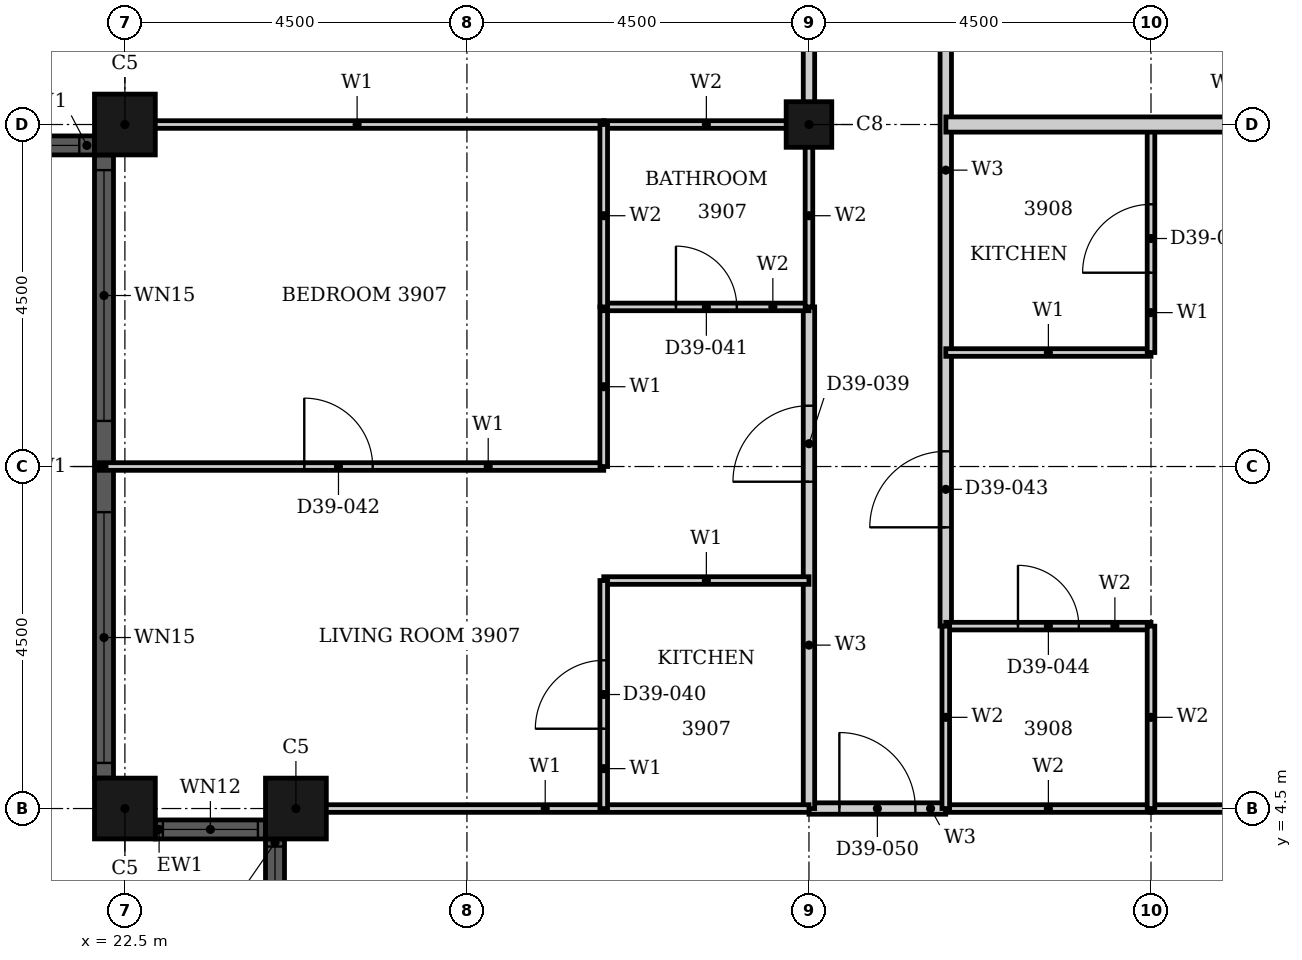
"""IFC4 building model, lengths in metres.
Left out: names, types, materials, properties, quantities, classifications, styles, units other than length and angle.
Written with IfcOpenShell. Run it as: python <this file> out.ifc"""

import sys

from ifc_helpers import new_model, si_unit, direction, frame, frame_2d, origin, origin_2d, place, context, subcontext, project, spatial, rectangle, hollow_rectangle, extrude, element, fill, save


model = new_model("IFC4")
c1 = context("Model", 3, precision=1e-05, world=origin(), true_north=direction((0.0, 1.0)))
c2 = subcontext(c1, "Body", "Model", "MODEL_VIEW")
j1 = project(units=[si_unit("LENGTHUNIT", "METRE"), si_unit("PLANEANGLEUNIT", "RADIAN")], contexts=[c1])
p1 = place(None, origin())
s1 = spatial("IfcSite", under=j1, at=p1, CompositionType="ELEMENT")
p2 = place(p1, origin())
s2 = spatial("IfcBuilding", under=s1, at=p2, CompositionType="ELEMENT")
p3 = place(p2, frame((0.0, 0.0, 158.0)))
s3 = spatial("IfcBuildingStorey", under=s2, at=p3, CompositionType="ELEMENT", Elevation=158.0)
for number, where, z_axis, x_axis in (
    (1, (22.5, 4.5, 0.0), (0.0, 0.0, 1.0), (1.0, 0.0, 0.0)),
    (2, (24.75, 4.5, 0.0), (0.0, 0.0, 1.0), (1.0, 0.0, 0.0)),
    (3, (22.5, 13.5, 0.0), (0.0, 0.0, 1.0), (1.0, 0.0, 0.0)),
):
    element("IfcColumn", number, at=place(p3, frame(where, z_axis=z_axis, x_axis=x_axis)), inside=s3, PredefinedType="COLUMN", context=c2, shape_type="SweptSolid", body=[
        extrude(hollow_rectangle(XDim=0.8, YDim=0.8, WallThickness=0.025, at=origin_2d()), origin(), (0.0, 0.0, 1.0), 3.7),
    ])
p4 = place(p3, frame((31.5, 13.5, 0.0), z_axis=(0.0, 0.0, 1.0), x_axis=(1.0, 0.0, 0.0)))
e4 = element("IfcColumn", 4, at=p4, inside=s3, PredefinedType="COLUMN", context=c2, shape_type="SweptSolid", body=[
    extrude(hollow_rectangle(XDim=0.6, YDim=0.6, WallThickness=0.02, at=origin_2d()), origin(), (0.0, 0.0, 1.0), 3.7),
])
p5 = place(p3, frame((22.9, 4.225, 0.0), z_axis=(0.0, 0.0, 1.0), x_axis=(1.0, 0.0, 0.0)))
e5 = element("IfcWall", 5, at=p5, inside=s3, PredefinedType="SOLIDWALL", context=c2, shape_type="SweptSolid", body=[
    extrude(rectangle(XDim=1.45, YDim=0.25, at=frame_2d((0.725, 0.0))), origin(), (0.0, 0.0, 1.0), 3.7),
])
p6 = place(p5, frame((0.1, 0.0, 0.9)))
e6 = element("IfcOpeningElement", 6, at=p6, cuts=e5, PredefinedType="OPENING", context=c2, shape_type="SweptSolid", body=[
    extrude(rectangle(XDim=1.25, YDim=2.08, at=frame_2d((0.625, 1.04))), frame((0.0, 0.135, 0.0), z_axis=(0.0, -1.0, 0.0), x_axis=(1.0, 0.0, 0.0)), (0.0, 0.0, 1.0), 0.27),
])
p7 = place(p3, frame((24.475, 4.1, 0.0), z_axis=(0.0, 0.0, 1.0), x_axis=(0.0, -1.0, 0.0)))
e7 = element("IfcWall", 7, at=p7, inside=s3, PredefinedType="SOLIDWALL", context=c2, shape_type="SweptSolid", body=[
    extrude(rectangle(XDim=1.45, YDim=0.25, at=frame_2d((0.725, 0.0))), origin(), (0.0, 0.0, 1.0), 3.7),
])
p8 = place(p7, frame((0.1, 0.0, 0.9)))
e8 = element("IfcOpeningElement", 8, at=p8, cuts=e7, PredefinedType="OPENING", context=c2, shape_type="SweptSolid", body=[
    extrude(rectangle(XDim=1.25, YDim=1.85, at=frame_2d((0.625, 0.925))), frame((0.0, 0.135, 0.0), z_axis=(0.0, -1.0, 0.0), x_axis=(1.0, 0.0, 0.0)), (0.0, 0.0, 1.0), 0.27),
])
p9 = place(p3, frame((18.4, 13.225, 0.0), z_axis=(0.0, 0.0, 1.0), x_axis=(1.0, 0.0, 0.0)))
e9 = element("IfcWall", 9, at=p9, inside=s3, PredefinedType="SOLIDWALL", context=c2, shape_type="SweptSolid", body=[
    extrude(rectangle(XDim=3.7, YDim=0.25, at=frame_2d((1.85, 0.0))), origin(), (0.0, 0.0, 1.0), 3.7),
])
p10 = place(p9, frame((0.2, 0.0, 0.45)))
e10 = element("IfcOpeningElement", 10, at=p10, cuts=e9, PredefinedType="OPENING", context=c2, shape_type="SweptSolid", body=[
    extrude(rectangle(XDim=3.3, YDim=2.3, at=frame_2d((1.65, 1.15))), frame((0.0, 0.135, 0.0), z_axis=(0.0, -1.0, 0.0), x_axis=(1.0, 0.0, 0.0)), (0.0, 0.0, 1.0), 0.27),
])
p11 = place(p3, frame((22.225, 13.1, 0.0), z_axis=(0.0, 0.0, 1.0), x_axis=(0.0, -1.0, 0.0)))
e11 = element("IfcWall", 11, at=p11, inside=s3, PredefinedType="SOLIDWALL", context=c2, shape_type="SweptSolid", body=[
    extrude(rectangle(XDim=8.2, YDim=0.25, at=frame_2d((4.1, 0.0))), origin(), (0.0, 0.0, 1.0), 3.7),
])
p12 = place(p11, frame((0.2, 0.0, 0.45)))
e12 = element("IfcOpeningElement", 12, at=p12, cuts=e11, PredefinedType="OPENING", context=c2, shape_type="SweptSolid", body=[
    extrude(rectangle(XDim=3.3, YDim=2.3, at=frame_2d((1.65, 1.15))), frame((0.0, 0.135, 0.0), z_axis=(0.0, -1.0, 0.0), x_axis=(1.0, 0.0, 0.0)), (0.0, 0.0, 1.0), 0.27),
])
p13 = place(p11, frame((4.7, 0.0, 0.45)))
e13 = element("IfcOpeningElement", 13, at=p13, cuts=e11, PredefinedType="OPENING", context=c2, shape_type="SweptSolid", body=[
    extrude(rectangle(XDim=3.3, YDim=2.3, at=frame_2d((1.65, 1.15))), frame((0.0, 0.135, 0.0), z_axis=(0.0, -1.0, 0.0), x_axis=(1.0, 0.0, 0.0)), (0.0, 0.0, 1.0), 0.27),
])
p14 = place(p3, frame((31.5, 4.5, 0.0), z_axis=(0.0, 0.0, 1.0), x_axis=(1.0, 0.0, 0.0)))
e14 = element("IfcWall", 14, at=p14, inside=s3, PredefinedType="PARTITIONING", context=c2, shape_type="SweptSolid", body=[
    extrude(rectangle(XDim=1.8, YDim=0.15, at=frame_2d((0.9, 0.0))), origin(), (0.0, 0.0, 1.0), 3.4),
])
p15 = place(p14, frame((0.4, 0.0, 0.0)))
e15 = element("IfcOpeningElement", 15, at=p15, cuts=e14, PredefinedType="OPENING", context=c2, shape_type="SweptSolid", body=[
    extrude(rectangle(XDim=1.0, YDim=2.1, at=frame_2d((0.5, 1.05))), frame((0.0, 0.085, 0.0), z_axis=(0.0, -1.0, 0.0), x_axis=(1.0, 0.0, 0.0)), (0.0, 0.0, 1.0), 0.17),
])
p16 = place(p3, frame((31.5, 4.5, 0.0), z_axis=(0.0, 0.0, 1.0), x_axis=(0.0, 1.0, 0.0)))
e16 = element("IfcWall", 16, at=p16, inside=s3, PredefinedType="PARTITIONING", context=c2, shape_type="SweptSolid", body=[
    extrude(rectangle(XDim=6.6, YDim=0.15, at=frame_2d((3.3, 0.0))), origin(), (0.0, 0.0, 1.0), 2.68),
])
p17 = place(p16, frame((4.3, 0.0, 0.0)))
e17 = element("IfcOpeningElement", 17, at=p17, cuts=e16, PredefinedType="OPENING", context=c2, shape_type="SweptSolid", body=[
    extrude(rectangle(XDim=1.0, YDim=2.2, at=frame_2d((0.5, 1.1))), frame((0.0, 0.085, 0.0), z_axis=(0.0, -1.0, 0.0), x_axis=(1.0, 0.0, 0.0)), (0.0, 0.0, 1.0), 0.17),
])
p18 = place(p3, frame((31.5, 13.5, 0.0), z_axis=(0.0, 0.0, 1.0), x_axis=(0.0, 1.0, 0.0)))
e18 = element("IfcWall", 18, at=p18, inside=s3, PredefinedType="PARTITIONING", context=c2, shape_type="SweptSolid", body=[
    extrude(rectangle(XDim=7.2, YDim=0.15, at=frame_2d((3.6, 0.0))), origin(), (0.0, 0.0, 1.0), 3.4),
])
p19 = place(p3, frame((33.3, 6.9, 0.0), z_axis=(0.0, 0.0, 1.0), x_axis=(0.0, 1.0, 0.0)))
e19 = element("IfcWall", 19, at=p19, inside=s3, PredefinedType="PARTITIONING", context=c2, shape_type="SweptSolid", body=[
    extrude(rectangle(XDim=13.799, YDim=0.15, at=frame_2d((6.899, 0.0))), origin(), (0.0, 0.0, 1.0), 3.4),
])
p20 = place(p19, frame((9.699, 0.0, 0.0)))
e20 = element("IfcOpeningElement", 20, at=p20, cuts=e19, PredefinedType="OPENING", context=c2, shape_type="SweptSolid", body=[
    extrude(rectangle(XDim=1.0, YDim=2.2, at=frame_2d((0.5, 1.1))), frame((0.0, 0.085, 0.0), z_axis=(0.0, -1.0, 0.0), x_axis=(1.0, 0.0, 0.0)), (0.0, 0.0, 1.0), 0.17),
])
p21 = place(p19, frame((1.3, 0.0, 0.0)))
e21 = element("IfcOpeningElement", 21, at=p21, cuts=e19, PredefinedType="OPENING", context=c2, shape_type="SweptSolid", body=[
    extrude(rectangle(XDim=1.0, YDim=2.2, at=frame_2d((0.5, 1.1))), frame((0.0, 0.085, 0.0), z_axis=(0.0, -1.0, 0.0), x_axis=(1.0, 0.0, 0.0)), (0.0, 0.0, 1.0), 0.17),
])
p22 = place(p3, frame((33.3, 10.5, 0.0), z_axis=(0.0, 0.0, 1.0), x_axis=(1.0, 0.0, 0.0)))
e22 = element("IfcWall", 22, at=p22, inside=s3, PredefinedType="PARTITIONING", context=c2, shape_type="SweptSolid", body=[
    extrude(rectangle(XDim=2.7, YDim=0.1, at=frame_2d((1.35, 0.0))), origin(), (0.0, 0.0, 1.0), 3.4),
])
p23 = place(p3, frame((22.31, 13.5, 0.0), z_axis=(0.0, 0.0, 1.0), x_axis=(1.0, 0.0, 0.0)))
e23 = element("IfcWall", 23, at=p23, inside=s3, PredefinedType="PARTITIONING", context=c2, shape_type="SweptSolid", body=[
    extrude(rectangle(XDim=6.49, YDim=0.1, at=frame_2d((3.245, 0.0))), origin(), (0.0, 0.0, 1.0), 2.48),
])
p24 = place(p3, frame((36.0, 4.5, 0.0), z_axis=(0.0, 0.0, 1.0), x_axis=(1.0, 0.0, 0.0)))
e24 = element("IfcWall", 24, at=p24, inside=s3, PredefinedType="PARTITIONING", context=c2, shape_type="SweptSolid", body=[
    extrude(rectangle(XDim=2.44, YDim=0.1, at=frame_2d((1.22, 0.0))), origin(), (0.0, 0.0, 1.0), 3.4),
])
p25 = place(p3, frame((24.56, 4.5, 0.0), z_axis=(0.0, 0.0, 1.0), x_axis=(1.0, 0.0, 0.0)))
e25 = element("IfcWall", 25, at=p25, inside=s3, PredefinedType="PARTITIONING", context=c2, shape_type="SweptSolid", body=[
    extrude(rectangle(XDim=6.94, YDim=0.1, at=frame_2d((3.47, 0.0))), origin(), (0.0, 0.0, 1.0), 3.4),
])
p26 = place(p3, frame((28.8, 7.5, 0.0), z_axis=(0.0, 0.0, 1.0), x_axis=(1.0, 0.0, 0.0)))
e26 = element("IfcWall", 26, at=p26, inside=s3, PredefinedType="PARTITIONING", context=c2, shape_type="SweptSolid", body=[
    extrude(rectangle(XDim=2.7, YDim=0.1, at=frame_2d((1.35, 0.0))), origin(), (0.0, 0.0, 1.0), 3.4),
])
p27 = place(p3, frame((22.16, 9.0, 0.0), z_axis=(0.0, 0.0, 1.0), x_axis=(1.0, 0.0, 0.0)))
e27 = element("IfcWall", 27, at=p27, inside=s3, PredefinedType="PARTITIONING", context=c2, shape_type="SweptSolid", body=[
    extrude(rectangle(XDim=6.64, YDim=0.1, at=frame_2d((3.32, 0.0))), origin(), (0.0, 0.0, 1.0), 3.4),
])
p28 = place(p27, frame((2.7, 0.0, 0.0)))
e28 = element("IfcOpeningElement", 28, at=p28, cuts=e27, PredefinedType="OPENING", context=c2, shape_type="SweptSolid", body=[
    extrude(rectangle(XDim=0.9, YDim=2.1, at=frame_2d((0.45, 1.05))), frame((0.0, 0.06, 0.0), z_axis=(0.0, -1.0, 0.0), x_axis=(1.0, 0.0, 0.0)), (0.0, 0.0, 1.0), 0.12),
])
p29 = place(p3, frame((28.8, 9.0, 0.0), z_axis=(0.0, 0.0, 1.0), x_axis=(0.0, 1.0, 0.0)))
e29 = element("IfcWall", 29, at=p29, inside=s3, PredefinedType="PARTITIONING", context=c2, shape_type="SweptSolid", body=[
    extrude(rectangle(XDim=2.1, YDim=0.1, at=frame_2d((1.05, 0.0))), origin(), (0.0, 0.0, 1.0), 3.4),
])
p30 = place(p3, frame((28.8, 4.5, 0.0), z_axis=(0.0, 0.0, 1.0), x_axis=(0.0, 1.0, 0.0)))
e30 = element("IfcWall", 30, at=p30, inside=s3, PredefinedType="PARTITIONING", context=c2, shape_type="SweptSolid", body=[
    extrude(rectangle(XDim=3.0, YDim=0.1, at=frame_2d((1.5, 0.0))), origin(), (0.0, 0.0, 1.0), 3.4),
])
p31 = place(p30, frame((1.05, 0.0, 0.0)))
e31 = element("IfcOpeningElement", 31, at=p31, cuts=e30, PredefinedType="OPENING", context=c2, shape_type="SweptSolid", body=[
    extrude(rectangle(XDim=0.9, YDim=2.1, at=frame_2d((0.45, 1.05))), frame((0.0, 0.06, 0.0), z_axis=(0.0, -1.0, 0.0), x_axis=(1.0, 0.0, 0.0)), (0.0, 0.0, 1.0), 0.12),
])
p32 = place(p3, frame((36.0, 10.5, 0.0), z_axis=(0.0, 0.0, 1.0), x_axis=(0.0, 1.0, 0.0)))
e32 = element("IfcWall", 32, at=p32, inside=s3, PredefinedType="PARTITIONING", context=c2, shape_type="SweptSolid", body=[
    extrude(rectangle(XDim=3.0, YDim=0.1, at=frame_2d((1.5, 0.0))), origin(), (0.0, 0.0, 1.0), 2.68),
])
p33 = place(p32, frame((1.05, 0.0, 0.0)))
e33 = element("IfcOpeningElement", 33, at=p33, cuts=e32, PredefinedType="OPENING", context=c2, shape_type="SweptSolid", body=[
    extrude(rectangle(XDim=0.9, YDim=2.1, at=frame_2d((0.45, 1.05))), frame((0.0, 0.06, 0.0), z_axis=(0.0, -1.0, 0.0), x_axis=(1.0, 0.0, 0.0)), (0.0, 0.0, 1.0), 0.12),
])
p34 = place(p3, frame((33.301, 13.5, 0.0), z_axis=(0.0, 0.0, 1.0), x_axis=(1.0, 0.0, 0.0)))
e34 = element("IfcWall", 34, at=p34, inside=s3, PredefinedType="PARTITIONING", context=c2, shape_type="SweptSolid", body=[
    extrude(rectangle(XDim=7.389, YDim=0.2, at=frame_2d((3.694, 0.0))), origin(), (0.0, 0.0, 1.0), 2.48),
])
p35 = place(p3, frame((28.8, 11.1, 0.0), z_axis=(0.0, 0.0, 1.0), x_axis=(1.0, 0.0, 0.0)))
e35 = element("IfcWall", 35, at=p35, inside=s3, PredefinedType="PARTITIONING", context=c2, shape_type="SweptSolid", body=[
    extrude(rectangle(XDim=2.7, YDim=0.1, at=frame_2d((1.35, 0.0))), origin(), (0.0, 0.0, 1.0), 3.4),
])
p36 = place(p35, frame((0.95, 0.0, 0.0)))
e36 = element("IfcOpeningElement", 36, at=p36, cuts=e35, PredefinedType="OPENING", context=c2, shape_type="SweptSolid", body=[
    extrude(rectangle(XDim=0.8, YDim=2.1, at=frame_2d((0.4, 1.05))), frame((0.0, 0.06, 0.0), z_axis=(0.0, -1.0, 0.0), x_axis=(1.0, 0.0, 0.0)), (0.0, 0.0, 1.0), 0.12),
])
p37 = place(p3, frame((28.8, 13.5, 0.0), z_axis=(0.0, 0.0, 1.0), x_axis=(1.0, 0.0, 0.0)))
e37 = element("IfcWall", 37, at=p37, inside=s3, PredefinedType="PARTITIONING", context=c2, shape_type="SweptSolid", body=[
    extrude(rectangle(XDim=2.7, YDim=0.1, at=frame_2d((1.35, 0.0))), origin(), (0.0, 0.0, 1.0), 2.48),
])
p38 = place(p3, frame((33.3, 4.5, 0.0), z_axis=(0.0, 0.0, 1.0), x_axis=(1.0, 0.0, 0.0)))
e38 = element("IfcWall", 38, at=p38, inside=s3, PredefinedType="PARTITIONING", context=c2, shape_type="SweptSolid", body=[
    extrude(rectangle(XDim=2.7, YDim=0.1, at=frame_2d((1.35, 0.0))), origin(), (0.0, 0.0, 1.0), 3.4),
])
p39 = place(p3, frame((33.3, 6.9, 0.0), z_axis=(0.0, 0.0, 1.0), x_axis=(1.0, 0.0, 0.0)))
e39 = element("IfcWall", 39, at=p39, inside=s3, PredefinedType="PARTITIONING", context=c2, shape_type="SweptSolid", body=[
    extrude(rectangle(XDim=2.7, YDim=0.1, at=frame_2d((1.35, 0.0))), origin(), (0.0, 0.0, 1.0), 3.4),
])
p40 = place(p39, frame((0.95, 0.0, 0.0)))
e40 = element("IfcOpeningElement", 40, at=p40, cuts=e39, PredefinedType="OPENING", context=c2, shape_type="SweptSolid", body=[
    extrude(rectangle(XDim=0.8, YDim=2.1, at=frame_2d((0.4, 1.05))), frame((0.0, 0.06, 0.0), z_axis=(0.0, -1.0, 0.0), x_axis=(1.0, 0.0, 0.0)), (0.0, 0.0, 1.0), 0.12),
])
p41 = place(p3, frame((28.8, 11.1, 0.0), z_axis=(0.0, 0.0, 1.0), x_axis=(0.0, 1.0, 0.0)))
e41 = element("IfcWall", 41, at=p41, inside=s3, PredefinedType="PARTITIONING", context=c2, shape_type="SweptSolid", body=[
    extrude(rectangle(XDim=2.4, YDim=0.1, at=frame_2d((1.2, 0.0))), origin(), (0.0, 0.0, 1.0), 3.4),
])
p42 = place(p3, frame((31.5, 11.1, 0.0), z_axis=(0.0, 0.0, 1.0), x_axis=(0.0, 1.0, 0.0)))
e42 = element("IfcWall", 42, at=p42, inside=s3, PredefinedType="PARTITIONING", context=c2, shape_type="SweptSolid", body=[
    extrude(rectangle(XDim=2.4, YDim=0.1, at=frame_2d((1.2, 0.0))), origin(), (0.0, 0.0, 1.0), 2.68),
])
p43 = place(p3, frame((33.3, 4.5, 0.0), z_axis=(0.0, 0.0, 1.0), x_axis=(0.0, 1.0, 0.0)))
e43 = element("IfcWall", 43, at=p43, inside=s3, PredefinedType="PARTITIONING", context=c2, shape_type="SweptSolid", body=[
    extrude(rectangle(XDim=2.4, YDim=0.1, at=frame_2d((1.2, 0.0))), origin(), (0.0, 0.0, 1.0), 3.4),
])
p44 = place(p3, frame((36.0, 4.5, 0.0), z_axis=(0.0, 0.0, 1.0), x_axis=(0.0, 1.0, 0.0)))
e44 = element("IfcWall", 44, at=p44, inside=s3, PredefinedType="PARTITIONING", context=c2, shape_type="SweptSolid", body=[
    extrude(rectangle(XDim=2.4, YDim=0.1, at=frame_2d((1.2, 0.0))), origin(), (0.0, 0.0, 1.0), 2.68),
])
p45 = place(p6, origin())
e45 = element("IfcWindow", 45, at=p45, inside=s3, PartitioningType="SINGLE_PANEL", PredefinedType="WINDOW", context=c2, shape_type="SweptSolid", body=[
    extrude(rectangle(XDim=1.25, YDim=2.08, at=frame_2d((0.625, 1.04))), frame((0.0, 0.03, 0.0), z_axis=(0.0, -1.0, 0.0), x_axis=(1.0, 0.0, 0.0)), (0.0, 0.0, 1.0), 0.06),
])
fill(e6, e45)
p46 = place(p8, origin())
e46 = element("IfcWindow", 46, at=p46, inside=s3, PartitioningType="SINGLE_PANEL", PredefinedType="WINDOW", context=c2, shape_type="SweptSolid", body=[
    extrude(rectangle(XDim=1.25, YDim=1.85, at=frame_2d((0.625, 0.925))), frame((0.0, 0.03, 0.0), z_axis=(0.0, -1.0, 0.0), x_axis=(1.0, 0.0, 0.0)), (0.0, 0.0, 1.0), 0.06),
])
fill(e8, e46)
p47 = place(p10, origin())
e47 = element("IfcWindow", 47, at=p47, inside=s3, PartitioningType="SINGLE_PANEL", PredefinedType="WINDOW", context=c2, shape_type="SweptSolid", body=[
    extrude(rectangle(XDim=3.3, YDim=2.3, at=frame_2d((1.65, 1.15))), frame((0.0, 0.03, 0.0), z_axis=(0.0, -1.0, 0.0), x_axis=(1.0, 0.0, 0.0)), (0.0, 0.0, 1.0), 0.06),
])
fill(e10, e47)
p48 = place(p12, origin())
e48 = element("IfcWindow", 48, at=p48, inside=s3, PartitioningType="SINGLE_PANEL", PredefinedType="WINDOW", context=c2, shape_type="SweptSolid", body=[
    extrude(rectangle(XDim=3.3, YDim=2.3, at=frame_2d((1.65, 1.15))), frame((0.0, 0.03, 0.0), z_axis=(0.0, -1.0, 0.0), x_axis=(1.0, 0.0, 0.0)), (0.0, 0.0, 1.0), 0.06),
])
fill(e12, e48)
p49 = place(p13, origin())
e49 = element("IfcWindow", 49, at=p49, inside=s3, PartitioningType="SINGLE_PANEL", PredefinedType="WINDOW", context=c2, shape_type="SweptSolid", body=[
    extrude(rectangle(XDim=3.3, YDim=2.3, at=frame_2d((1.65, 1.15))), frame((0.0, 0.03, 0.0), z_axis=(0.0, -1.0, 0.0), x_axis=(1.0, 0.0, 0.0)), (0.0, 0.0, 1.0), 0.06),
])
fill(e13, e49)
p50 = place(p17, origin())
e50 = element("IfcDoor", 50, at=p50, inside=s3, OperationType="SINGLE_SWING_LEFT", PredefinedType="DOOR", context=c2, shape_type="SweptSolid", body=[
    extrude(rectangle(XDim=1.0, YDim=2.2, at=frame_2d((0.5, 1.1))), frame((0.0, 0.025, 0.0), z_axis=(0.0, -1.0, 0.0), x_axis=(1.0, 0.0, 0.0)), (0.0, 0.0, 1.0), 0.05),
])
fill(e17, e50)
p51 = place(p31, origin())
e51 = element("IfcDoor", 51, at=p51, inside=s3, OperationType="SINGLE_SWING_LEFT", PredefinedType="DOOR", context=c2, shape_type="SweptSolid", body=[
    extrude(rectangle(XDim=0.9, YDim=2.1, at=frame_2d((0.45, 1.05))), frame((0.0, 0.025, 0.0), z_axis=(0.0, -1.0, 0.0), x_axis=(1.0, 0.0, 0.0)), (0.0, 0.0, 1.0), 0.05),
])
fill(e31, e51)
p52 = place(p36, origin())
e52 = element("IfcDoor", 52, at=p52, inside=s3, OperationType="SINGLE_SWING_LEFT", PredefinedType="DOOR", context=c2, shape_type="SweptSolid", body=[
    extrude(rectangle(XDim=0.8, YDim=2.1, at=frame_2d((0.4, 1.05))), frame((0.0, 0.025, 0.0), z_axis=(0.0, -1.0, 0.0), x_axis=(1.0, 0.0, 0.0)), (0.0, 0.0, 1.0), 0.05),
])
fill(e36, e52)
p53 = place(p28, origin())
e53 = element("IfcDoor", 53, at=p53, inside=s3, OperationType="SINGLE_SWING_LEFT", PredefinedType="DOOR", context=c2, shape_type="SweptSolid", body=[
    extrude(rectangle(XDim=0.9, YDim=2.1, at=frame_2d((0.45, 1.05))), frame((0.0, 0.025, 0.0), z_axis=(0.0, -1.0, 0.0), x_axis=(1.0, 0.0, 0.0)), (0.0, 0.0, 1.0), 0.05),
])
fill(e28, e53)
p54 = place(p21, origin())
e54 = element("IfcDoor", 54, at=p54, inside=s3, OperationType="SINGLE_SWING_LEFT", PredefinedType="DOOR", context=c2, shape_type="SweptSolid", body=[
    extrude(rectangle(XDim=1.0, YDim=2.2, at=frame_2d((0.5, 1.1))), frame((0.0, 0.025, 0.0), z_axis=(0.0, -1.0, 0.0), x_axis=(1.0, 0.0, 0.0)), (0.0, 0.0, 1.0), 0.05),
])
fill(e21, e54)
p55 = place(p40, origin())
e55 = element("IfcDoor", 55, at=p55, inside=s3, OperationType="SINGLE_SWING_LEFT", PredefinedType="DOOR", context=c2, shape_type="SweptSolid", body=[
    extrude(rectangle(XDim=0.8, YDim=2.1, at=frame_2d((0.4, 1.05))), frame((0.0, 0.025, 0.0), z_axis=(0.0, -1.0, 0.0), x_axis=(1.0, 0.0, 0.0)), (0.0, 0.0, 1.0), 0.05),
])
fill(e40, e55)
p56 = place(p33, origin())
e56 = element("IfcDoor", 56, at=p56, inside=s3, OperationType="SINGLE_SWING_RIGHT", PredefinedType="DOOR", context=c2, shape_type="SweptSolid", body=[
    extrude(rectangle(XDim=0.9, YDim=2.1, at=frame_2d((0.45, 1.05))), frame((0.0, 0.025, 0.0), z_axis=(0.0, -1.0, 0.0), x_axis=(1.0, 0.0, 0.0)), (0.0, 0.0, 1.0), 0.05),
])
fill(e33, e56)
p57 = place(p15, origin())
e57 = element("IfcDoor", 57, at=p57, inside=s3, OperationType="SINGLE_SWING_LEFT", PredefinedType="DOOR", context=c2, shape_type="SweptSolid", body=[
    extrude(rectangle(XDim=1.0, YDim=2.1, at=frame_2d((0.5, 1.05))), frame((0.0, 0.025, 0.0), z_axis=(0.0, -1.0, 0.0), x_axis=(1.0, 0.0, 0.0)), (0.0, 0.0, 1.0), 0.05),
])
fill(e15, e57)
save(model, sys.argv[1])
